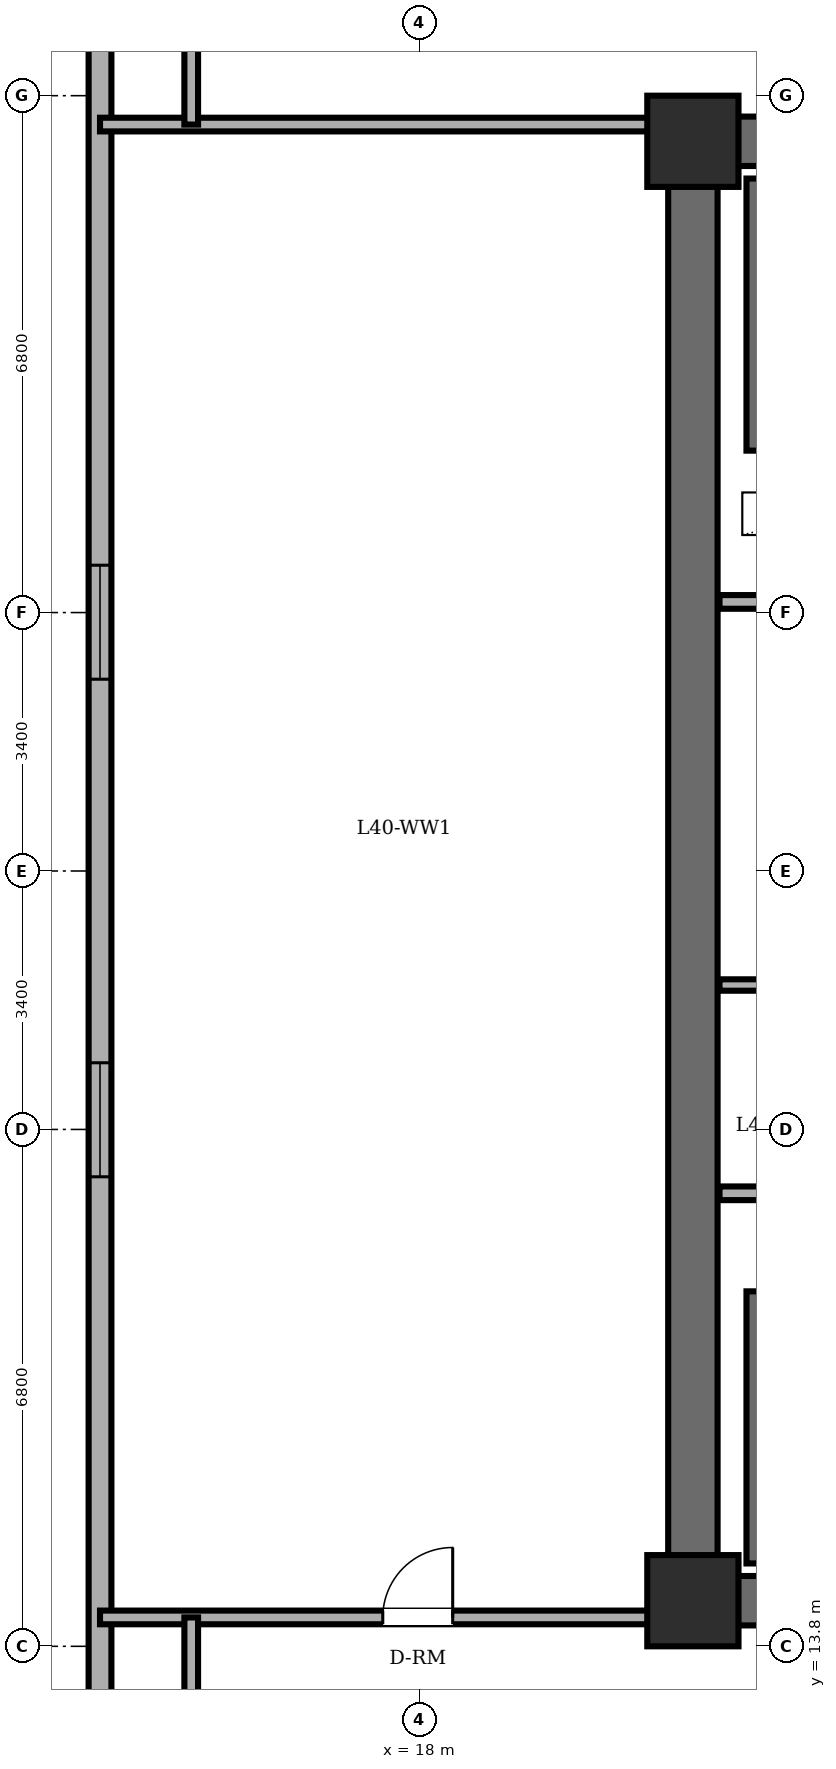
"""IFC4 building model, lengths in metres.
Left out: names, types, materials, properties, quantities, classifications, styles, units other than length and angle.
Written with IfcOpenShell. Run it as: python <this file> out.ifc"""

import sys

from ifc_helpers import new_model, si_unit, direction, frame, frame_2d, origin, origin_2d, place, context, subcontext, project, spatial, rectangle, extrude, element, fill, save


model = new_model("IFC4")
c1 = context("Model", 3, precision=1e-05, world=origin(), true_north=direction((0.0, 1.0)))
c2 = subcontext(c1, "Body", "Model", "MODEL_VIEW")
j1 = project(units=[si_unit("LENGTHUNIT", "METRE"), si_unit("PLANEANGLEUNIT", "RADIAN")], contexts=[c1])
p1 = place(None, origin())
s1 = spatial("IfcSite", under=j1, at=p1, CompositionType="ELEMENT")
p2 = place(p1, origin())
s2 = spatial("IfcBuilding", under=s1, at=p2, CompositionType="ELEMENT")
p3 = place(p2, frame((0.0, 0.0, 154.6)))
s3 = spatial("IfcBuildingStorey", under=s2, at=p3, CompositionType="ELEMENT", Elevation=154.6)
for number, where, z_axis, x_axis in (
    (1, (21.6, 14.4, 0.0), (0.0, 0.0, 1.0), (1.0, 0.0, 0.0)),
    (2, (21.6, 33.6, 0.0), (0.0, 0.0, 1.0), (1.0, 0.0, 0.0)),
):
    element("IfcColumn", number, at=place(p3, frame(where, z_axis=z_axis, x_axis=x_axis)), inside=s3, PredefinedType="COLUMN", context=c2, shape_type="SweptSolid", body=[
        extrude(rectangle(XDim=1.2, YDim=1.2, at=origin_2d()), origin(), (0.0, 0.0, 1.0), 3.6),
    ])
p4 = place(p3, frame((13.8, 36.3, 0.0), z_axis=(0.0, 0.0, 1.0), x_axis=(0.0, -1.0, 0.0)))
e3 = element("IfcWall", 3, at=p4, inside=s3, PredefinedType="SOLIDWALL", context=c2, shape_type="SweptSolid", body=[
    extrude(rectangle(XDim=24.6, YDim=0.3, at=frame_2d((12.3, 0.0))), origin(), (0.0, 0.0, 1.0), 3.4),
])
p5 = place(p4, frame((8.277, 0.0, 0.85)))
e4 = element("IfcOpeningElement", 4, at=p5, cuts=e3, PredefinedType="OPENING", context=c2, shape_type="SweptSolid", body=[
    extrude(rectangle(XDim=1.5, YDim=1.55, at=frame_2d((0.75, 0.775))), frame((0.0, 0.16, 0.0), z_axis=(0.0, -1.0, 0.0), x_axis=(1.0, 0.0, 0.0)), (0.0, 0.0, 1.0), 0.32),
])
p6 = place(p4, frame((14.823, 0.0, 0.85)))
e5 = element("IfcOpeningElement", 5, at=p6, cuts=e3, PredefinedType="OPENING", context=c2, shape_type="SweptSolid", body=[
    extrude(rectangle(XDim=1.5, YDim=1.55, at=frame_2d((0.75, 0.775))), frame((0.0, 0.16, 0.0), z_axis=(0.0, -1.0, 0.0), x_axis=(1.0, 0.0, 0.0)), (0.0, 0.0, 1.0), 0.32),
])
p7 = place(p3, frame((21.6, 14.4, 0.0), z_axis=(0.0, 0.0, 1.0), x_axis=(0.0, 1.0, 0.0)))
e6 = element("IfcWall", 6, at=p7, inside=s3, PredefinedType="SHEAR", context=c2, shape_type="SweptSolid", body=[
    extrude(rectangle(XDim=19.2, YDim=0.65, at=frame_2d((9.6, 0.0))), origin(), (0.0, 0.0, 1.0), 3.4),
])
for number, where, z_axis, x_axis in (
    (7, (21.6, 33.6, 0.0), (0.0, 0.0, 1.0), (1.0, 0.0, 0.0)),
    (8, (37.2, 14.4, 0.0), (0.0, 0.0, 1.0), (-1.0, 0.0, 0.0)),
):
    element("IfcWall", number, at=place(p3, frame(where, z_axis=z_axis, x_axis=x_axis)), inside=s3, PredefinedType="SHEAR", context=c2, shape_type="SweptSolid", body=[
        extrude(rectangle(XDim=15.6, YDim=0.65, at=frame_2d((7.8, 0.0))), origin(), (0.0, 0.0, 1.0), 3.4),
    ])
for number, where, z_axis, x_axis in (
    (9, (22.48, 29.53, 0.0), (0.0, 0.0, 1.0), (0.0, 1.0, 0.0)),
    (10, (22.48, 14.89, 0.0), (0.0, 0.0, 1.0), (0.0, 1.0, 0.0)),
):
    element("IfcWall", number, at=place(p3, frame(where, z_axis=z_axis, x_axis=x_axis)), inside=s3, PredefinedType="SOLIDWALL", context=c2, shape_type="SweptSolid", body=[
        extrude(rectangle(XDim=3.58, YDim=0.35, at=frame_2d((1.79, 0.0))), origin(), (0.0, 0.0, 1.0), 3.4),
    ])
p8 = place(p3, frame((21.95, 27.54, 0.0), z_axis=(0.0, 0.0, 1.0), x_axis=(1.0, 0.0, 0.0)))
e11 = element("IfcWall", 11, at=p8, inside=s3, PredefinedType="PARTITIONING", context=c2, shape_type="SweptSolid", body=[
    extrude(rectangle(XDim=10.56, YDim=0.18, at=frame_2d((5.28, 0.0))), origin(), (0.0, 0.0, 1.0), 3.4),
])
p9 = place(p3, frame((21.95, 19.76, 0.0), z_axis=(0.0, 0.0, 1.0), x_axis=(1.0, 0.0, 0.0)))
e12 = element("IfcWall", 12, at=p9, inside=s3, PredefinedType="PARTITIONING", context=c2, shape_type="SweptSolid", body=[
    extrude(rectangle(XDim=14.87, YDim=0.18, at=frame_2d((7.435, 0.0))), origin(), (0.0, 0.0, 1.0), 3.4),
])
p10 = place(p3, frame((21.95, 22.5, 0.0), z_axis=(0.0, 0.0, 1.0), x_axis=(1.0, 0.0, 0.0)))
e13 = element("IfcWall", 13, at=p10, inside=s3, PredefinedType="PARTITIONING", context=c2, shape_type="SweptSolid", body=[
    extrude(rectangle(XDim=2.51, YDim=0.15, at=frame_2d((1.255, 0.0))), origin(), (0.0, 0.0, 1.0), 3.4),
])
p11 = place(p3, frame((13.8, 14.18, 0.0), z_axis=(0.0, 0.0, 1.0), x_axis=(1.0, 0.0, 0.0)))
e14 = element("IfcWall", 14, at=p11, inside=s3, PredefinedType="PARTITIONING", context=c2, shape_type="SweptSolid", body=[
    extrude(rectangle(XDim=7.68, YDim=0.18, at=frame_2d((3.84, 0.0))), origin(), (0.0, 0.0, 1.0), 3.4),
])
p12 = place(p11, frame((3.72, 0.0, 0.0)))
e15 = element("IfcOpeningElement", 15, at=p12, cuts=e14, PredefinedType="OPENING", context=c2, shape_type="SweptSolid", body=[
    extrude(rectangle(XDim=0.92, YDim=2.1, at=frame_2d((0.46, 1.05))), frame((0.0, 0.1, 0.0), z_axis=(0.0, -1.0, 0.0), x_axis=(1.0, 0.0, 0.0)), (0.0, 0.0, 1.0), 0.2),
])
p13 = place(p3, frame((13.8, 33.82, 0.0), z_axis=(0.0, 0.0, 1.0), x_axis=(1.0, 0.0, 0.0)))
e16 = element("IfcWall", 16, at=p13, inside=s3, PredefinedType="PARTITIONING", context=c2, shape_type="SweptSolid", body=[
    extrude(rectangle(XDim=7.68, YDim=0.18, at=frame_2d((3.84, 0.0))), origin(), (0.0, 0.0, 1.0), 3.4),
])
for number, where, z_axis, x_axis in (
    (17, (15.0, 8.487, 0.0), (0.0, 0.0, 1.0), (0.0, 1.0, 0.0)),
    (18, (15.0, 33.82, 0.0), (0.0, 0.0, 1.0), (0.0, 1.0, 0.0)),
):
    element("IfcWall", number, at=place(p3, frame(where, z_axis=z_axis, x_axis=x_axis)), inside=s3, PredefinedType="PARTITIONING", context=c2, shape_type="SweptSolid", body=[
        extrude(rectangle(XDim=5.693, YDim=0.18, at=frame_2d((2.846, 0.0))), origin(), (0.0, 0.0, 1.0), 3.4),
    ])
p14 = place(p5, origin())
e19 = element("IfcWindow", 19, at=p14, inside=s3, PartitioningType="DOUBLE_PANEL_VERTICAL", PredefinedType="WINDOW", context=c2, shape_type="SweptSolid", body=[
    extrude(rectangle(XDim=1.5, YDim=1.55, at=frame_2d((0.75, 0.775))), frame((0.0, 0.03, 0.0), z_axis=(0.0, -1.0, 0.0), x_axis=(1.0, 0.0, 0.0)), (0.0, 0.0, 1.0), 0.06),
])
fill(e4, e19)
p15 = place(p6, origin())
e20 = element("IfcWindow", 20, at=p15, inside=s3, PartitioningType="DOUBLE_PANEL_VERTICAL", PredefinedType="WINDOW", context=c2, shape_type="SweptSolid", body=[
    extrude(rectangle(XDim=1.5, YDim=1.55, at=frame_2d((0.75, 0.775))), frame((0.0, 0.03, 0.0), z_axis=(0.0, -1.0, 0.0), x_axis=(1.0, 0.0, 0.0)), (0.0, 0.0, 1.0), 0.06),
])
fill(e5, e20)
p16 = place(p12, origin())
e21 = element("IfcDoor", 21, at=p16, inside=s3, OperationType="SINGLE_SWING_RIGHT", PredefinedType="DOOR", context=c2, shape_type="SweptSolid", body=[
    extrude(rectangle(XDim=0.92, YDim=2.1, at=frame_2d((0.46, 1.05))), frame((0.0, 0.025, 0.0), z_axis=(0.0, -1.0, 0.0), x_axis=(1.0, 0.0, 0.0)), (0.0, 0.0, 1.0), 0.05),
])
fill(e15, e21)
save(model, sys.argv[1])
